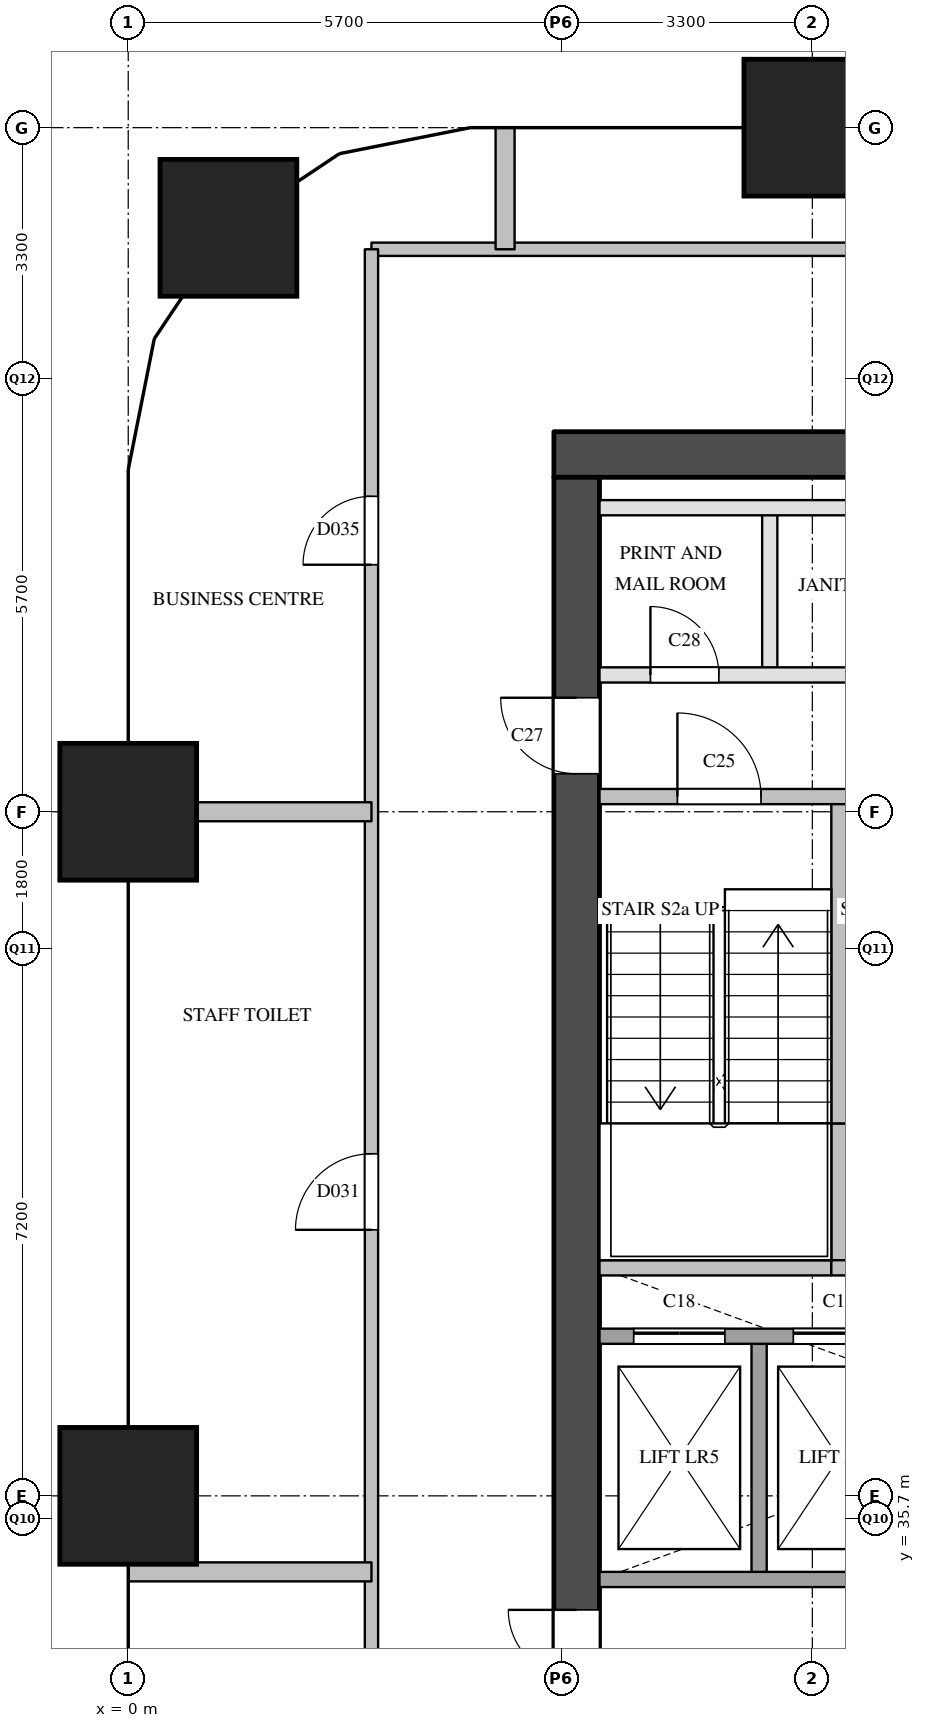
"""IFC4 building model, lengths in metres.
Left out: names, types, materials, properties, quantities, classifications, styles, units other than length and angle.
Written with IfcOpenShell. Run it as: python <this file> out.ifc"""

import sys

from ifc_helpers import new_model, si_unit, direction, frame, frame_2d, origin, origin_2d, place, context, subcontext, project, spatial, rectangle, extrude, element, fill, save


model = new_model("IFC4")
c1 = context("Model", 3, precision=1e-05, world=origin(), true_north=direction((0.0, 1.0)))
c2 = subcontext(c1, "Body", "Model", "MODEL_VIEW")
j1 = project(units=[si_unit("LENGTHUNIT", "METRE"), si_unit("PLANEANGLEUNIT", "RADIAN")], contexts=[c1])
p1 = place(None, origin())
s1 = spatial("IfcSite", under=j1, at=p1, CompositionType="ELEMENT")
p2 = place(p1, origin())
s2 = spatial("IfcBuilding", under=s1, at=p2, CompositionType="ELEMENT")
p3 = place(p2, frame((0.0, 0.0, 50.0)))
s3 = spatial("IfcBuildingStorey", under=s2, at=p3, CompositionType="ELEMENT", Elevation=50.0)
for number, where, z_axis, x_axis in (
    (1, (0.0, 36.0, 0.0), (0.0, 0.0, 1.0), (1.0, 0.0, 0.0)),
    (2, (0.0, 45.0, 0.0), (0.0, 0.0, 1.0), (1.0, 0.0, 0.0)),
    (3, (1.318, 52.682, 0.0), (0.0, 0.0, 1.0), (1.0, 0.0, 0.0)),
    (4, (9.0, 54.0, 0.0), (0.0, 0.0, 1.0), (1.0, 0.0, 0.0)),
):
    element("IfcColumn", number, at=place(p3, frame(where, z_axis=z_axis, x_axis=x_axis)), inside=s3, PredefinedType="COLUMN", context=c2, shape_type="SweptSolid", body=[
        extrude(rectangle(XDim=1.8, YDim=1.8, at=origin_2d()), origin(), (0.0, 0.0, 1.0), 3.8),
    ])
p4 = place(p3, frame((5.6, 49.7, 0.0), z_axis=(0.0, 0.0, 1.0), x_axis=(1.0, 0.0, 0.0)))
e5 = element("IfcWall", 5, at=p4, inside=s3, PredefinedType="SHEAR", context=c2, shape_type="SweptSolid", body=[
    extrude(rectangle(XDim=12.4, YDim=0.6, at=frame_2d((6.2, 0.0))), origin(), (0.0, 0.0, 1.0), 3.5),
])
p5 = place(p3, frame((5.9, 29.1, 0.0), z_axis=(0.0, 0.0, 1.0), x_axis=(0.0, 1.0, 0.0)))
e6 = element("IfcWall", 6, at=p5, inside=s3, PredefinedType="SHEAR", context=c2, shape_type="SweptSolid", body=[
    extrude(rectangle(XDim=20.3, YDim=0.6, at=frame_2d((10.15, 0.0))), origin(), (0.0, 0.0, 1.0), 3.5),
])
p6 = place(p5, frame((3.6, 0.0, 0.0)))
e7 = element("IfcOpeningElement", 7, at=p6, cuts=e6, PredefinedType="OPENING", context=c2, shape_type="SweptSolid", body=[
    extrude(rectangle(XDim=1.8, YDim=2.1, at=frame_2d((0.9, 1.05))), frame((0.0, 0.31, 0.0), z_axis=(0.0, -1.0, 0.0), x_axis=(1.0, 0.0, 0.0)), (0.0, 0.0, 1.0), 0.62),
])
p7 = place(p5, frame((16.4, 0.0, 0.0)))
e8 = element("IfcOpeningElement", 8, at=p7, cuts=e6, PredefinedType="OPENING", context=c2, shape_type="SweptSolid", body=[
    extrude(rectangle(XDim=1.0, YDim=2.1, at=frame_2d((0.5, 1.05))), frame((0.0, 0.31, 0.0), z_axis=(0.0, -1.0, 0.0), x_axis=(1.0, 0.0, 0.0)), (0.0, 0.0, 1.0), 0.62),
])
p8 = place(p3, frame((8.3, 34.9, 0.0), z_axis=(0.0, 0.0, 1.0), x_axis=(0.0, 1.0, 0.0)))
e9 = element("IfcWall", 9, at=p8, inside=s3, PredefinedType="SOLIDWALL", context=c2, shape_type="SweptSolid", body=[
    extrude(rectangle(XDim=3.2, YDim=0.2, at=frame_2d((1.6, 0.0))), origin(), (0.0, 0.0, 1.0), 3.5),
])
p9 = place(p3, frame((8.44, 46.8, 0.0), z_axis=(0.0, 0.0, 1.0), x_axis=(0.0, 1.0, 0.0)))
e10 = element("IfcWall", 10, at=p9, inside=s3, PredefinedType="PARTITIONING", context=c2, shape_type="SweptSolid", body=[
    extrude(rectangle(XDim=2.2, YDim=0.2, at=frame_2d((1.1, 0.0))), origin(), (0.0, 0.0, 1.0), 3.5),
])
p10 = place(p3, frame((9.35, 39.0, 0.0), z_axis=(0.0, 0.0, 1.0), x_axis=(0.0, 1.0, 0.0)))
e11 = element("IfcWall", 11, at=p10, inside=s3, PredefinedType="SOLIDWALL", context=c2, shape_type="SweptSolid", body=[
    extrude(rectangle(XDim=1.9, YDim=0.2, at=frame_2d((0.95, 0.0))), origin(), (0.0, 0.0, 1.0), 3.5),
])
p11 = place(p3, frame((9.35, 40.9, 0.0), z_axis=(0.0, 0.0, 1.0), x_axis=(0.0, 1.0, 0.0)))
e12 = element("IfcWall", 12, at=p11, inside=s3, PredefinedType="SOLIDWALL", context=c2, shape_type="SweptSolid", body=[
    extrude(rectangle(XDim=4.3, YDim=0.2, at=frame_2d((2.15, 0.0))), origin(), (0.0, 0.0, 1.0), 3.5),
])
p12 = place(p3, frame((6.2, 34.9, 0.0), z_axis=(0.0, 0.0, 1.0), x_axis=(1.0, 0.0, 0.0)))
e13 = element("IfcWall", 13, at=p12, inside=s3, PredefinedType="SOLIDWALL", context=c2, shape_type="SweptSolid", body=[
    extrude(rectangle(XDim=11.2, YDim=0.2, at=frame_2d((5.6, 0.0))), origin(), (0.0, 0.0, 1.0), 3.5),
])
p13 = place(p3, frame((6.2, 38.1, 0.0), z_axis=(0.0, 0.0, 1.0), x_axis=(1.0, 0.0, 0.0)))
e14 = element("IfcWall", 14, at=p13, inside=s3, PredefinedType="SOLIDWALL", context=c2, shape_type="SweptSolid", body=[
    extrude(rectangle(XDim=11.2, YDim=0.2, at=frame_2d((5.6, 0.0))), origin(), (0.0, 0.0, 1.0), 3.5),
])
p14 = place(p13, frame((0.45, 0.0, 0.0)))
e15 = element("IfcOpeningElement", 15, at=p14, cuts=e14, PredefinedType="OPENING", context=c2, shape_type="SweptSolid", body=[
    extrude(rectangle(XDim=1.2, YDim=2.1, at=frame_2d((0.6, 1.05))), frame((0.0, 0.11, 0.0), z_axis=(0.0, -1.0, 0.0), x_axis=(1.0, 0.0, 0.0)), (0.0, 0.0, 1.0), 0.22),
])
p15 = place(p13, frame((2.55, 0.0, 0.0)))
e16 = element("IfcOpeningElement", 16, at=p15, cuts=e14, PredefinedType="OPENING", context=c2, shape_type="SweptSolid", body=[
    extrude(rectangle(XDim=1.2, YDim=2.1, at=frame_2d((0.6, 1.05))), frame((0.0, 0.11, 0.0), z_axis=(0.0, -1.0, 0.0), x_axis=(1.0, 0.0, 0.0)), (0.0, 0.0, 1.0), 0.22),
])
p16 = place(p13, frame((4.65, 0.0, 0.0)))
e17 = element("IfcOpeningElement", 17, at=p16, cuts=e14, PredefinedType="OPENING", context=c2, shape_type="SweptSolid", body=[
    extrude(rectangle(XDim=1.2, YDim=2.1, at=frame_2d((0.6, 1.05))), frame((0.0, 0.11, 0.0), z_axis=(0.0, -1.0, 0.0), x_axis=(1.0, 0.0, 0.0)), (0.0, 0.0, 1.0), 0.22),
])
p17 = place(p13, frame((6.75, 0.0, 0.0)))
e18 = element("IfcOpeningElement", 18, at=p17, cuts=e14, PredefinedType="OPENING", context=c2, shape_type="SweptSolid", body=[
    extrude(rectangle(XDim=1.2, YDim=2.1, at=frame_2d((0.6, 1.05))), frame((0.0, 0.11, 0.0), z_axis=(0.0, -1.0, 0.0), x_axis=(1.0, 0.0, 0.0)), (0.0, 0.0, 1.0), 0.22),
])
p18 = place(p3, frame((6.2, 39.0, 0.0), z_axis=(0.0, 0.0, 1.0), x_axis=(1.0, 0.0, 0.0)))
e19 = element("IfcWall", 19, at=p18, inside=s3, PredefinedType="SOLIDWALL", context=c2, shape_type="SweptSolid", body=[
    extrude(rectangle(XDim=3.05, YDim=0.2, at=frame_2d((1.525, 0.0))), origin(), (0.0, 0.0, 1.0), 3.5),
])
p19 = place(p3, frame((9.25, 39.0, 0.0), z_axis=(0.0, 0.0, 1.0), x_axis=(1.0, 0.0, 0.0)))
e20 = element("IfcWall", 20, at=p19, inside=s3, PredefinedType="SOLIDWALL", context=c2, shape_type="SweptSolid", body=[
    extrude(rectangle(XDim=0.2, YDim=0.2, at=frame_2d((0.1, 0.0))), origin(), (0.0, 0.0, 1.0), 3.5),
])
p20 = place(p3, frame((6.2, 45.2, 0.0), z_axis=(0.0, 0.0, 1.0), x_axis=(1.0, 0.0, 0.0)))
e21 = element("IfcWall", 21, at=p20, inside=s3, PredefinedType="SOLIDWALL", context=c2, shape_type="SweptSolid", body=[
    extrude(rectangle(XDim=6.3, YDim=0.2, at=frame_2d((3.15, 0.0))), origin(), (0.0, 0.0, 1.0), 3.5),
])
p21 = place(p20, frame((1.025, 0.0, 0.0)))
e22 = element("IfcOpeningElement", 22, at=p21, cuts=e21, PredefinedType="OPENING", context=c2, shape_type="SweptSolid", body=[
    extrude(rectangle(XDim=1.1, YDim=2.1, at=frame_2d((0.55, 1.05))), frame((0.0, 0.11, 0.0), z_axis=(0.0, -1.0, 0.0), x_axis=(1.0, 0.0, 0.0)), (0.0, 0.0, 1.0), 0.22),
])
p22 = place(p20, frame((4.175, 0.0, 0.0)))
e23 = element("IfcOpeningElement", 23, at=p22, cuts=e21, PredefinedType="OPENING", context=c2, shape_type="SweptSolid", body=[
    extrude(rectangle(XDim=1.1, YDim=2.1, at=frame_2d((0.55, 1.05))), frame((0.0, 0.11, 0.0), z_axis=(0.0, -1.0, 0.0), x_axis=(1.0, 0.0, 0.0)), (0.0, 0.0, 1.0), 0.22),
])
p23 = place(p3, frame((6.2, 46.8, 0.0), z_axis=(0.0, 0.0, 1.0), x_axis=(1.0, 0.0, 0.0)))
e24 = element("IfcWall", 24, at=p23, inside=s3, PredefinedType="PARTITIONING", context=c2, shape_type="SweptSolid", body=[
    extrude(rectangle(XDim=11.2, YDim=0.2, at=frame_2d((5.6, 0.0))), origin(), (0.0, 0.0, 1.0), 3.5),
])
p24 = place(p23, frame((0.67, 0.0, 0.0)))
e25 = element("IfcOpeningElement", 25, at=p24, cuts=e24, PredefinedType="OPENING", context=c2, shape_type="SweptSolid", body=[
    extrude(rectangle(XDim=0.9, YDim=2.1, at=frame_2d((0.45, 1.05))), frame((0.0, 0.11, 0.0), z_axis=(0.0, -1.0, 0.0), x_axis=(1.0, 0.0, 0.0)), (0.0, 0.0, 1.0), 0.22),
])
p25 = place(p23, frame((4.59, 0.0, 0.0)))
e26 = element("IfcOpeningElement", 26, at=p25, cuts=e24, PredefinedType="OPENING", context=c2, shape_type="SweptSolid", body=[
    extrude(rectangle(XDim=0.9, YDim=2.1, at=frame_2d((0.45, 1.05))), frame((0.0, 0.11, 0.0), z_axis=(0.0, -1.0, 0.0), x_axis=(1.0, 0.0, 0.0)), (0.0, 0.0, 1.0), 0.22),
])
p26 = place(p23, frame((9.07, 0.0, 0.0)))
e27 = element("IfcOpeningElement", 27, at=p26, cuts=e24, PredefinedType="OPENING", context=c2, shape_type="SweptSolid", body=[
    extrude(rectangle(XDim=0.9, YDim=2.1, at=frame_2d((0.45, 1.05))), frame((0.0, 0.11, 0.0), z_axis=(0.0, -1.0, 0.0), x_axis=(1.0, 0.0, 0.0)), (0.0, 0.0, 1.0), 0.22),
])
p27 = place(p3, frame((6.2, 49.0, 0.0), z_axis=(0.0, 0.0, 1.0), x_axis=(1.0, 0.0, 0.0)))
e28 = element("IfcWall", 28, at=p27, inside=s3, PredefinedType="PARTITIONING", context=c2, shape_type="SweptSolid", body=[
    extrude(rectangle(XDim=11.2, YDim=0.2, at=frame_2d((5.6, 0.0))), origin(), (0.0, 0.0, 1.0), 3.5),
])
p28 = place(p3, frame((3.2, 52.4, 0.0), z_axis=(0.0, 0.0, 1.0), x_axis=(1.0, 0.0, 0.0)))
e29 = element("IfcWall", 29, at=p28, inside=s3, PredefinedType="PARTITIONING", context=c2, shape_type="SweptSolid", body=[
    extrude(rectangle(XDim=17.2, YDim=0.175, at=frame_2d((8.6, 0.0))), origin(), (0.0, 0.0, 1.0), 3.5),
])
p29 = place(p28, frame((8.058, 0.0, 0.0)))
e30 = element("IfcOpeningElement", 30, at=p29, cuts=e29, PredefinedType="OPENING", context=c2, shape_type="SweptSolid", body=[
    extrude(rectangle(XDim=0.9, YDim=2.1, at=frame_2d((0.45, 1.05))), frame((0.0, 0.097, 0.0), z_axis=(0.0, -1.0, 0.0), x_axis=(1.0, 0.0, 0.0)), (0.0, 0.0, 1.0), 0.195),
])
p30 = place(p28, frame((12.54, 0.0, 0.0)))
e31 = element("IfcOpeningElement", 31, at=p30, cuts=e29, PredefinedType="OPENING", context=c2, shape_type="SweptSolid", body=[
    extrude(rectangle(XDim=1.0, YDim=2.1, at=frame_2d((0.5, 1.05))), frame((0.0, 0.097, 0.0), z_axis=(0.0, -1.0, 0.0), x_axis=(1.0, 0.0, 0.0)), (0.0, 0.0, 1.0), 0.195),
])
p31 = place(p3, frame((3.2, 26.1, 0.0), z_axis=(0.0, 0.0, 1.0), x_axis=(0.0, 1.0, 0.0)))
e32 = element("IfcWall", 32, at=p31, inside=s3, PredefinedType="PARTITIONING", context=c2, shape_type="SweptSolid", body=[
    extrude(rectangle(XDim=26.3, YDim=0.175, at=frame_2d((13.15, 0.0))), origin(), (0.0, 0.0, 1.0), 2.5),
])
p32 = place(p31, frame((4.0, 0.0, 0.0)))
e33 = element("IfcOpeningElement", 33, at=p32, cuts=e32, PredefinedType="OPENING", context=c2, shape_type="SweptSolid", body=[
    extrude(rectangle(XDim=0.9, YDim=2.1, at=frame_2d((0.45, 1.05))), frame((0.0, 0.097, 0.0), z_axis=(0.0, -1.0, 0.0), x_axis=(1.0, 0.0, 0.0)), (0.0, 0.0, 1.0), 0.195),
])
p33 = place(p31, frame((13.4, 0.0, 0.0)))
e34 = element("IfcOpeningElement", 34, at=p33, cuts=e32, PredefinedType="OPENING", context=c2, shape_type="SweptSolid", body=[
    extrude(rectangle(XDim=1.0, YDim=2.1, at=frame_2d((0.5, 1.05))), frame((0.0, 0.097, 0.0), z_axis=(0.0, -1.0, 0.0), x_axis=(1.0, 0.0, 0.0)), (0.0, 0.0, 1.0), 0.195),
])
p34 = place(p31, frame((22.15, 0.0, 0.0)))
e35 = element("IfcOpeningElement", 35, at=p34, cuts=e32, PredefinedType="OPENING", context=c2, shape_type="SweptSolid", body=[
    extrude(rectangle(XDim=0.9, YDim=2.1, at=frame_2d((0.45, 1.05))), frame((0.0, 0.097, 0.0), z_axis=(0.0, -1.0, 0.0), x_axis=(1.0, 0.0, 0.0)), (0.0, 0.0, 1.0), 0.195),
])
p35 = place(p3, frame((0.0, 35.0, 0.0), z_axis=(0.0, 0.0, 1.0), x_axis=(1.0, 0.0, 0.0)))
e36 = element("IfcWall", 36, at=p35, inside=s3, PredefinedType="PARTITIONING", context=c2, shape_type="SweptSolid", body=[
    extrude(rectangle(XDim=3.2, YDim=0.25, at=frame_2d((1.6, 0.0))), origin(), (0.0, 0.0, 1.0), 2.5),
])
p36 = place(p3, frame((0.0, 45.0, 0.0), z_axis=(0.0, 0.0, 1.0), x_axis=(1.0, 0.0, 0.0)))
e37 = element("IfcWall", 37, at=p36, inside=s3, PredefinedType="PARTITIONING", context=c2, shape_type="SweptSolid", body=[
    extrude(rectangle(XDim=3.2, YDim=0.25, at=frame_2d((1.6, 0.0))), origin(), (0.0, 0.0, 1.0), 3.5),
])
p37 = place(p3, frame((4.958, 52.4, 0.0), z_axis=(0.0, 0.0, 1.0), x_axis=(0.0, 1.0, 0.0)))
e38 = element("IfcWall", 38, at=p37, inside=s3, PredefinedType="PARTITIONING", context=c2, shape_type="SweptSolid", body=[
    extrude(rectangle(XDim=1.6, YDim=0.25, at=frame_2d((0.8, 0.0))), origin(), (0.0, 0.0, 1.0), 2.5),
])
p38 = place(p14, origin())
e39 = element("IfcDoor", 39, at=p38, inside=s3, OperationType="SLIDING_TO_LEFT", PredefinedType="DOOR", context=c2, shape_type="SweptSolid", body=[
    extrude(rectangle(XDim=1.2, YDim=2.1, at=frame_2d((0.6, 1.05))), frame((0.0, 0.025, 0.0), z_axis=(0.0, -1.0, 0.0), x_axis=(1.0, 0.0, 0.0)), (0.0, 0.0, 1.0), 0.05),
])
fill(e15, e39)
p39 = place(p15, origin())
e40 = element("IfcDoor", 40, at=p39, inside=s3, OperationType="SLIDING_TO_LEFT", PredefinedType="DOOR", context=c2, shape_type="SweptSolid", body=[
    extrude(rectangle(XDim=1.2, YDim=2.1, at=frame_2d((0.6, 1.05))), frame((0.0, 0.025, 0.0), z_axis=(0.0, -1.0, 0.0), x_axis=(1.0, 0.0, 0.0)), (0.0, 0.0, 1.0), 0.05),
])
fill(e16, e40)
p40 = place(p6, origin())
e41 = element("IfcDoor", 41, at=p40, inside=s3, OperationType="DOUBLE_DOOR_SINGLE_SWING", PredefinedType="DOOR", context=c2, shape_type="SweptSolid", body=[
    extrude(rectangle(XDim=1.8, YDim=2.1, at=frame_2d((0.9, 1.05))), frame((0.0, 0.025, 0.0), z_axis=(0.0, -1.0, 0.0), x_axis=(1.0, 0.0, 0.0)), (0.0, 0.0, 1.0), 0.05),
])
fill(e7, e41)
p41 = place(p21, origin())
e42 = element("IfcDoor", 42, at=p41, inside=s3, OperationType="SINGLE_SWING_LEFT", PredefinedType="DOOR", context=c2, shape_type="SweptSolid", body=[
    extrude(rectangle(XDim=1.1, YDim=2.1, at=frame_2d((0.55, 1.05))), frame((0.0, 0.025, 0.0), z_axis=(0.0, -1.0, 0.0), x_axis=(1.0, 0.0, 0.0)), (0.0, 0.0, 1.0), 0.05),
])
fill(e22, e42)
p42 = place(p7, origin())
e43 = element("IfcDoor", 43, at=p42, inside=s3, OperationType="SINGLE_SWING_RIGHT", PredefinedType="DOOR", context=c2, shape_type="SweptSolid", body=[
    extrude(rectangle(XDim=1.0, YDim=2.1, at=frame_2d((0.5, 1.05))), frame((0.0, 0.025, 0.0), z_axis=(0.0, -1.0, 0.0), x_axis=(1.0, 0.0, 0.0)), (0.0, 0.0, 1.0), 0.05),
])
fill(e8, e43)
p43 = place(p24, origin())
e44 = element("IfcDoor", 44, at=p43, inside=s3, OperationType="SINGLE_SWING_LEFT", PredefinedType="DOOR", context=c2, shape_type="SweptSolid", body=[
    extrude(rectangle(XDim=0.9, YDim=2.1, at=frame_2d((0.45, 1.05))), frame((0.0, 0.025, 0.0), z_axis=(0.0, -1.0, 0.0), x_axis=(1.0, 0.0, 0.0)), (0.0, 0.0, 1.0), 0.05),
])
fill(e25, e44)
p44 = place(p33, origin())
e45 = element("IfcDoor", 45, at=p44, inside=s3, OperationType="SINGLE_SWING_LEFT", PredefinedType="DOOR", context=c2, shape_type="SweptSolid", body=[
    extrude(rectangle(XDim=1.0, YDim=2.1, at=frame_2d((0.5, 1.05))), frame((0.0, 0.025, 0.0), z_axis=(0.0, -1.0, 0.0), x_axis=(1.0, 0.0, 0.0)), (0.0, 0.0, 1.0), 0.05),
])
fill(e34, e45)
p45 = place(p34, origin())
e46 = element("IfcDoor", 46, at=p45, inside=s3, OperationType="SINGLE_SWING_LEFT", PredefinedType="DOOR", context=c2, shape_type="SweptSolid", body=[
    extrude(rectangle(XDim=0.9, YDim=2.1, at=frame_2d((0.45, 1.05))), frame((0.0, 0.025, 0.0), z_axis=(0.0, -1.0, 0.0), x_axis=(1.0, 0.0, 0.0)), (0.0, 0.0, 1.0), 0.05),
])
fill(e35, e46)
save(model, sys.argv[1])
